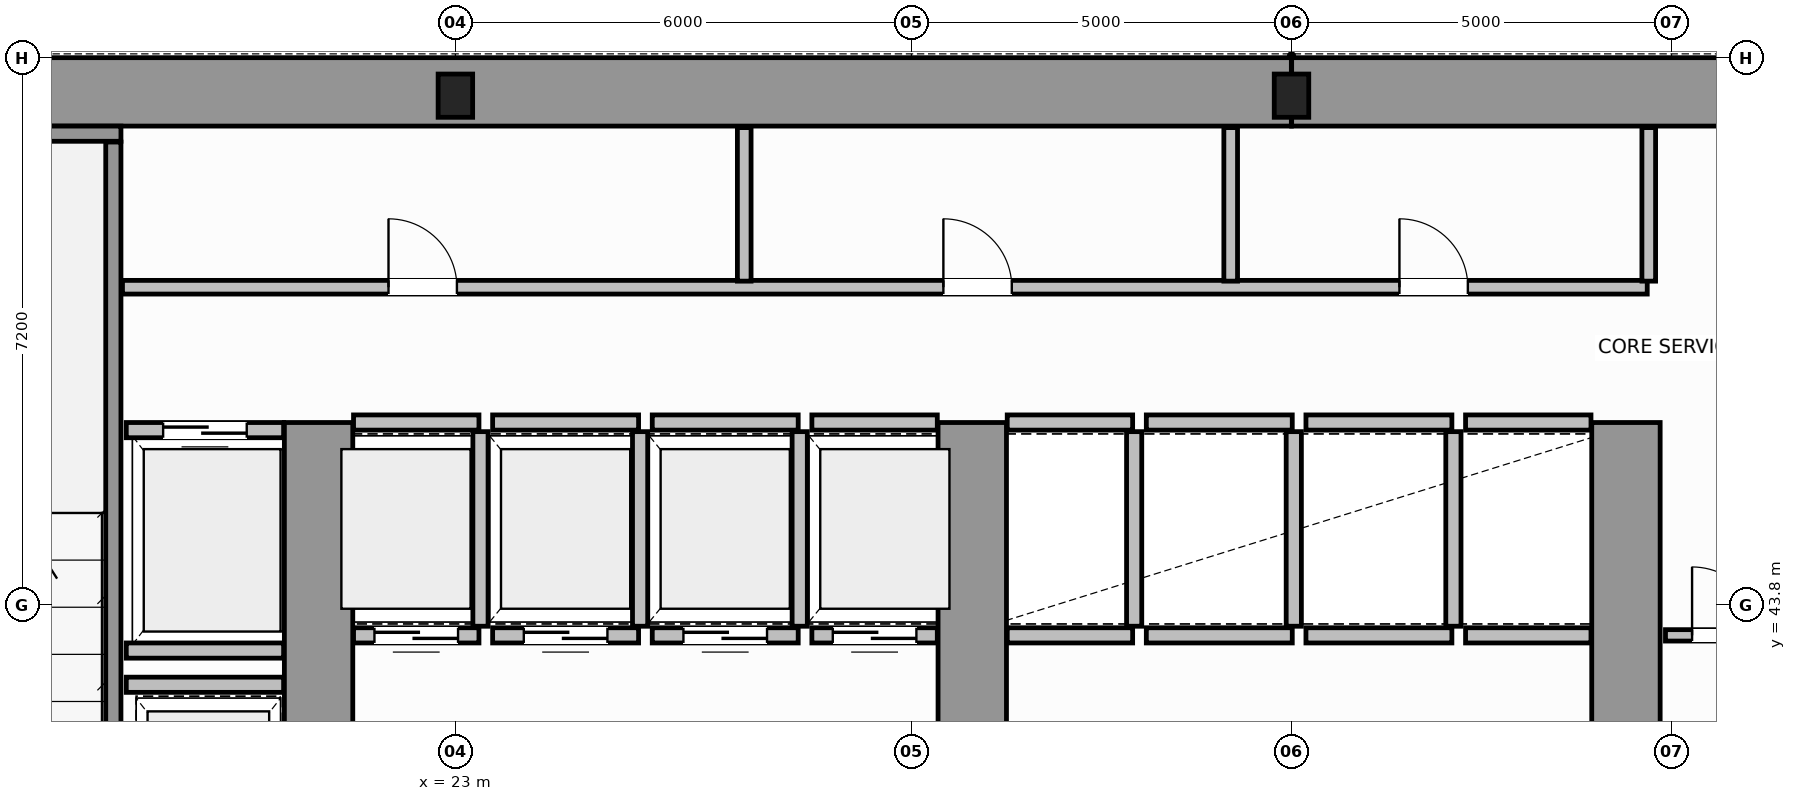
"""IFC4 building model, lengths in metres.
Left out: names, types, materials, properties, quantities, classifications, styles, units other than length and angle.
Written with IfcOpenShell. Run it as: python <this file> out.ifc"""

import sys

from ifc_helpers import new_model, si_unit, direction, frame, frame_2d, origin, origin_2d, place, context, subcontext, project, spatial, rectangle, i_section, extrude, source, transform, mapped, element, fill, save


model = new_model("IFC4")
c1 = context("Model", 3, precision=1e-05, world=origin(), true_north=direction((0.0, 1.0)))
c2 = subcontext(c1, "Body", "Model", "MODEL_VIEW")
j1 = project(units=[si_unit("LENGTHUNIT", "METRE"), si_unit("PLANEANGLEUNIT", "RADIAN")], contexts=[c1])
p1 = place(None, origin())
s1 = spatial("IfcSite", under=j1, at=p1, CompositionType="ELEMENT")
p2 = place(p1, origin())
s2 = spatial("IfcBuilding", under=s1, at=p2, CompositionType="ELEMENT")
p3 = place(p2, frame((0.0, 0.0, 56.8)))
s3 = spatial("IfcBuildingStorey", under=s2, at=p3, CompositionType="ELEMENT", Elevation=56.8)
m1 = source(origin(), c2, "Body", "SweptSolid", [
    extrude(i_section(OverallWidth=0.454, OverallDepth=0.569, WebThickness=0.078, FlangeThickness=0.08, FilletRadius=0.015, at=origin_2d()), origin(), (0.0, 0.0, 1.0), 3.8),
])
for number, where, z_axis, x_axis in (
    (1, (23.0, 50.5, 0.0), (0.0, 0.0, 1.0), (1.0, 0.0, 0.0)),
    (2, (34.0, 50.5, 0.0), (0.0, 0.0, 1.0), (1.0, 0.0, 0.0)),
):
    element("IfcColumn", number, at=place(p3, frame(where, z_axis=z_axis, x_axis=x_axis)), inside=s3, PredefinedType="COLUMN", context=c2, shape_type="MappedRepresentation", body=[
        mapped(m1, transform((0.0, 0.0, 0.0), scale=1.0)),
    ])
for number, where, z_axis, x_axis in (
    (3, (14.454, 50.55, 0.0), (0.0, 0.0, 1.0), (1.0, 0.0, 0.0)),
    (4, (34.002, 50.55, 0.0), (0.0, 0.0, 1.0), (1.0, 0.0, 0.0)),
):
    element("IfcWall", number, at=place(p3, frame(where, z_axis=z_axis, x_axis=x_axis)), inside=s3, PredefinedType="SHEAR", context=c2, shape_type="SweptSolid", body=[
        extrude(rectangle(XDim=19.544, YDim=0.9, at=frame_2d((9.772, 0.0))), origin(), (0.0, 0.0, 1.0), 3.8),
    ])
for number, where, z_axis, x_axis in (
    (5, (21.2, 36.97, 0.0), (0.0, 0.0, 1.0), (0.0, 1.0, 0.0)),
    (6, (29.8, 36.97, 0.0), (0.0, 0.0, 1.0), (0.0, 1.0, 0.0)),
    (7, (38.4, 36.97, 0.0), (0.0, 0.0, 1.0), (0.0, 1.0, 0.0)),
):
    element("IfcWall", number, at=place(p3, frame(where, z_axis=z_axis, x_axis=x_axis)), inside=s3, PredefinedType="SHEAR", context=c2, shape_type="SweptSolid", body=[
        extrude(rectangle(XDim=9.23, YDim=0.9, at=frame_2d((4.615, 0.0))), origin(), (0.0, 0.0, 1.0), 3.8),
    ])
p4 = place(p3, frame((14.45, 50.0, 0.0), z_axis=(0.0, 0.0, 1.0), x_axis=(1.0, 0.0, 0.0)))
e8 = element("IfcWall", 8, at=p4, inside=s3, PredefinedType="SOLIDWALL", context=c2, shape_type="SweptSolid", body=[
    extrude(rectangle(XDim=4.15, YDim=0.2, at=frame_2d((2.075, 0.0))), origin(), (0.0, 0.0, 1.0), 3.8),
])
p5 = place(p3, frame((18.5, 39.96, 0.0), z_axis=(0.0, 0.0, 1.0), x_axis=(0.0, 1.0, 0.0)))
e9 = element("IfcWall", 9, at=p5, inside=s3, PredefinedType="SOLIDWALL", context=c2, shape_type="SweptSolid", body=[
    extrude(rectangle(XDim=9.93, YDim=0.2, at=frame_2d((4.965, 0.0))), origin(), (0.0, 0.0, 1.0), 3.8),
])
p6 = place(p3, frame((21.66, 43.4, 0.0), z_axis=(0.0, 0.0, 1.0), x_axis=(1.0, 0.0, 0.0)))
e10 = element("IfcWall", 10, at=p6, inside=s3, PredefinedType="SOLIDWALL", context=c2, shape_type="SweptSolid", body=[
    extrude(rectangle(XDim=1.65, YDim=0.2, at=frame_2d((0.825, 0.0))), origin(), (0.0, 0.0, 1.0), 3.58),
])
p7 = place(p6, frame((0.275, 0.0, 0.0)))
e11 = element("IfcOpeningElement", 11, at=p7, cuts=e10, PredefinedType="OPENING", context=c2, shape_type="SweptSolid", body=[
    extrude(rectangle(XDim=1.1, YDim=2.15, at=frame_2d((0.55, 1.075))), frame((0.0, 0.11, 0.0), z_axis=(0.0, -1.0, 0.0), x_axis=(1.0, 0.0, 0.0)), (0.0, 0.0, 1.0), 0.22),
])
p8 = place(p3, frame((21.66, 46.2, 0.0), z_axis=(0.0, 0.0, 1.0), x_axis=(1.0, 0.0, 0.0)))
e12 = element("IfcWall", 12, at=p8, inside=s3, PredefinedType="SOLIDWALL", context=c2, shape_type="SweptSolid", body=[
    extrude(rectangle(XDim=1.65, YDim=0.2, at=frame_2d((0.825, 0.0))), origin(), (0.0, 0.0, 1.0), 3.58),
])
p9 = place(p3, frame((23.33, 43.52, 0.0), z_axis=(0.0, 0.0, 1.0), x_axis=(0.0, 1.0, 0.0)))
e13 = element("IfcWall", 13, at=p9, inside=s3, PredefinedType="SOLIDWALL", context=c2, shape_type="SweptSolid", body=[
    extrude(rectangle(XDim=2.56, YDim=0.2, at=frame_2d((1.28, 0.0))), origin(), (0.0, 0.0, 1.0), 3.58),
])
p10 = place(p3, frame((23.49, 43.4, 0.0), z_axis=(0.0, 0.0, 1.0), x_axis=(1.0, 0.0, 0.0)))
e14 = element("IfcWall", 14, at=p10, inside=s3, PredefinedType="SOLIDWALL", context=c2, shape_type="SweptSolid", body=[
    extrude(rectangle(XDim=1.92, YDim=0.2, at=frame_2d((0.96, 0.0))), origin(), (0.0, 0.0, 1.0), 3.58),
])
p11 = place(p10, frame((0.41, 0.0, 0.0)))
e15 = element("IfcOpeningElement", 15, at=p11, cuts=e14, PredefinedType="OPENING", context=c2, shape_type="SweptSolid", body=[
    extrude(rectangle(XDim=1.1, YDim=2.15, at=frame_2d((0.55, 1.075))), frame((0.0, 0.11, 0.0), z_axis=(0.0, -1.0, 0.0), x_axis=(1.0, 0.0, 0.0)), (0.0, 0.0, 1.0), 0.22),
])
p12 = place(p3, frame((23.49, 46.2, 0.0), z_axis=(0.0, 0.0, 1.0), x_axis=(1.0, 0.0, 0.0)))
e16 = element("IfcWall", 16, at=p12, inside=s3, PredefinedType="SOLIDWALL", context=c2, shape_type="SweptSolid", body=[
    extrude(rectangle(XDim=1.92, YDim=0.2, at=frame_2d((0.96, 0.0))), origin(), (0.0, 0.0, 1.0), 3.58),
])
p13 = place(p3, frame((25.43, 43.52, 0.0), z_axis=(0.0, 0.0, 1.0), x_axis=(0.0, 1.0, 0.0)))
e17 = element("IfcWall", 17, at=p13, inside=s3, PredefinedType="SOLIDWALL", context=c2, shape_type="SweptSolid", body=[
    extrude(rectangle(XDim=2.56, YDim=0.2, at=frame_2d((1.28, 0.0))), origin(), (0.0, 0.0, 1.0), 3.58),
])
p14 = place(p3, frame((25.59, 43.4, 0.0), z_axis=(0.0, 0.0, 1.0), x_axis=(1.0, 0.0, 0.0)))
e18 = element("IfcWall", 18, at=p14, inside=s3, PredefinedType="SOLIDWALL", context=c2, shape_type="SweptSolid", body=[
    extrude(rectangle(XDim=1.92, YDim=0.2, at=frame_2d((0.96, 0.0))), origin(), (0.0, 0.0, 1.0), 3.58),
])
p15 = place(p14, frame((0.41, 0.0, 0.0)))
e19 = element("IfcOpeningElement", 19, at=p15, cuts=e18, PredefinedType="OPENING", context=c2, shape_type="SweptSolid", body=[
    extrude(rectangle(XDim=1.1, YDim=2.15, at=frame_2d((0.55, 1.075))), frame((0.0, 0.11, 0.0), z_axis=(0.0, -1.0, 0.0), x_axis=(1.0, 0.0, 0.0)), (0.0, 0.0, 1.0), 0.22),
])
p16 = place(p3, frame((25.59, 46.2, 0.0), z_axis=(0.0, 0.0, 1.0), x_axis=(1.0, 0.0, 0.0)))
e20 = element("IfcWall", 20, at=p16, inside=s3, PredefinedType="SOLIDWALL", context=c2, shape_type="SweptSolid", body=[
    extrude(rectangle(XDim=1.92, YDim=0.2, at=frame_2d((0.96, 0.0))), origin(), (0.0, 0.0, 1.0), 3.58),
])
p17 = place(p3, frame((27.53, 43.52, 0.0), z_axis=(0.0, 0.0, 1.0), x_axis=(0.0, 1.0, 0.0)))
e21 = element("IfcWall", 21, at=p17, inside=s3, PredefinedType="SOLIDWALL", context=c2, shape_type="SweptSolid", body=[
    extrude(rectangle(XDim=2.56, YDim=0.2, at=frame_2d((1.28, 0.0))), origin(), (0.0, 0.0, 1.0), 3.58),
])
p18 = place(p3, frame((27.69, 43.4, 0.0), z_axis=(0.0, 0.0, 1.0), x_axis=(1.0, 0.0, 0.0)))
e22 = element("IfcWall", 22, at=p18, inside=s3, PredefinedType="SOLIDWALL", context=c2, shape_type="SweptSolid", body=[
    extrude(rectangle(XDim=1.65, YDim=0.2, at=frame_2d((0.825, 0.0))), origin(), (0.0, 0.0, 1.0), 3.58),
])
p19 = place(p18, frame((0.275, 0.0, 0.0)))
e23 = element("IfcOpeningElement", 23, at=p19, cuts=e22, PredefinedType="OPENING", context=c2, shape_type="SweptSolid", body=[
    extrude(rectangle(XDim=1.1, YDim=2.15, at=frame_2d((0.55, 1.075))), frame((0.0, 0.11, 0.0), z_axis=(0.0, -1.0, 0.0), x_axis=(1.0, 0.0, 0.0)), (0.0, 0.0, 1.0), 0.22),
])
p20 = place(p3, frame((27.69, 46.2, 0.0), z_axis=(0.0, 0.0, 1.0), x_axis=(1.0, 0.0, 0.0)))
e24 = element("IfcWall", 24, at=p20, inside=s3, PredefinedType="SOLIDWALL", context=c2, shape_type="SweptSolid", body=[
    extrude(rectangle(XDim=1.65, YDim=0.2, at=frame_2d((0.825, 0.0))), origin(), (0.0, 0.0, 1.0), 3.58),
])
for number, where, z_axis, x_axis in (
    (25, (30.26, 43.4, 0.0), (0.0, 0.0, 1.0), (1.0, 0.0, 0.0)),
    (26, (30.26, 46.2, 0.0), (0.0, 0.0, 1.0), (1.0, 0.0, 0.0)),
):
    element("IfcWall", number, at=place(p3, frame(where, z_axis=z_axis, x_axis=x_axis)), inside=s3, PredefinedType="SOLIDWALL", context=c2, shape_type="SweptSolid", body=[
        extrude(rectangle(XDim=1.65, YDim=0.2, at=frame_2d((0.825, 0.0))), origin(), (0.0, 0.0, 1.0), 3.58),
    ])
p21 = place(p3, frame((31.93, 43.52, 0.0), z_axis=(0.0, 0.0, 1.0), x_axis=(0.0, 1.0, 0.0)))
e27 = element("IfcWall", 27, at=p21, inside=s3, PredefinedType="SOLIDWALL", context=c2, shape_type="SweptSolid", body=[
    extrude(rectangle(XDim=2.56, YDim=0.2, at=frame_2d((1.28, 0.0))), origin(), (0.0, 0.0, 1.0), 3.58),
])
for number, where, z_axis, x_axis in (
    (28, (32.09, 43.4, 0.0), (0.0, 0.0, 1.0), (1.0, 0.0, 0.0)),
    (29, (32.09, 46.2, 0.0), (0.0, 0.0, 1.0), (1.0, 0.0, 0.0)),
):
    element("IfcWall", number, at=place(p3, frame(where, z_axis=z_axis, x_axis=x_axis)), inside=s3, PredefinedType="SOLIDWALL", context=c2, shape_type="SweptSolid", body=[
        extrude(rectangle(XDim=1.92, YDim=0.2, at=frame_2d((0.96, 0.0))), origin(), (0.0, 0.0, 1.0), 3.58),
    ])
p22 = place(p3, frame((34.03, 43.52, 0.0), z_axis=(0.0, 0.0, 1.0), x_axis=(0.0, 1.0, 0.0)))
e30 = element("IfcWall", 30, at=p22, inside=s3, PredefinedType="SOLIDWALL", context=c2, shape_type="SweptSolid", body=[
    extrude(rectangle(XDim=2.56, YDim=0.2, at=frame_2d((1.28, 0.0))), origin(), (0.0, 0.0, 1.0), 3.58),
])
for number, where, z_axis, x_axis in (
    (31, (34.19, 43.4, 0.0), (0.0, 0.0, 1.0), (1.0, 0.0, 0.0)),
    (32, (34.19, 46.2, 0.0), (0.0, 0.0, 1.0), (1.0, 0.0, 0.0)),
):
    element("IfcWall", number, at=place(p3, frame(where, z_axis=z_axis, x_axis=x_axis)), inside=s3, PredefinedType="SOLIDWALL", context=c2, shape_type="SweptSolid", body=[
        extrude(rectangle(XDim=1.92, YDim=0.2, at=frame_2d((0.96, 0.0))), origin(), (0.0, 0.0, 1.0), 3.58),
    ])
p23 = place(p3, frame((36.13, 43.52, 0.0), z_axis=(0.0, 0.0, 1.0), x_axis=(0.0, 1.0, 0.0)))
e33 = element("IfcWall", 33, at=p23, inside=s3, PredefinedType="SOLIDWALL", context=c2, shape_type="SweptSolid", body=[
    extrude(rectangle(XDim=2.56, YDim=0.2, at=frame_2d((1.28, 0.0))), origin(), (0.0, 0.0, 1.0), 3.58),
])
for number, where, z_axis, x_axis in (
    (34, (36.29, 43.4, 0.0), (0.0, 0.0, 1.0), (1.0, 0.0, 0.0)),
    (35, (36.29, 46.2, 0.0), (0.0, 0.0, 1.0), (1.0, 0.0, 0.0)),
):
    element("IfcWall", number, at=place(p3, frame(where, z_axis=z_axis, x_axis=x_axis)), inside=s3, PredefinedType="SOLIDWALL", context=c2, shape_type="SweptSolid", body=[
        extrude(rectangle(XDim=1.65, YDim=0.2, at=frame_2d((0.825, 0.0))), origin(), (0.0, 0.0, 1.0), 3.58),
    ])
p24 = place(p3, frame((18.67, 46.1, 0.0), z_axis=(0.0, 0.0, 1.0), x_axis=(1.0, 0.0, 0.0)))
e36 = element("IfcWall", 36, at=p24, inside=s3, PredefinedType="SOLIDWALL", context=c2, shape_type="SweptSolid", body=[
    extrude(rectangle(XDim=2.07, YDim=0.2, at=frame_2d((1.035, 0.0))), origin(), (0.0, 0.0, 1.0), 3.58),
])
p25 = place(p24, frame((0.485, 0.0, 0.0)))
e37 = element("IfcOpeningElement", 37, at=p25, cuts=e36, PredefinedType="OPENING", context=c2, shape_type="SweptSolid", body=[
    extrude(rectangle(XDim=1.1, YDim=2.15, at=frame_2d((0.55, 1.075))), frame((0.0, 0.11, 0.0), z_axis=(0.0, -1.0, 0.0), x_axis=(1.0, 0.0, 0.0)), (0.0, 0.0, 1.0), 0.22),
])
for number, where, z_axis, x_axis in (
    (38, (18.67, 43.2, 0.0), (0.0, 0.0, 1.0), (1.0, 0.0, 0.0)),
    (39, (18.67, 42.75, 0.0), (0.0, 0.0, 1.0), (1.0, 0.0, 0.0)),
):
    element("IfcWall", number, at=place(p3, frame(where, z_axis=z_axis, x_axis=x_axis)), inside=s3, PredefinedType="SOLIDWALL", context=c2, shape_type="SweptSolid", body=[
        extrude(rectangle(XDim=2.07, YDim=0.2, at=frame_2d((1.035, 0.0))), origin(), (0.0, 0.0, 1.0), 3.58),
    ])
p26 = place(p3, frame((38.92, 43.4, 0.0), z_axis=(0.0, 0.0, 1.0), x_axis=(1.0, 0.0, 0.0)))
e40 = element("IfcWall", 40, at=p26, inside=s3, PredefinedType="PARTITIONING", context=c2, shape_type="SweptSolid", body=[
    extrude(rectangle(XDim=1.6, YDim=0.15, at=frame_2d((0.8, 0.0))), origin(), (0.0, 0.0, 1.0), 3.58),
])
p27 = place(p26, frame((0.35, 0.0, 0.0)))
e41 = element("IfcOpeningElement", 41, at=p27, cuts=e40, PredefinedType="OPENING", context=c2, shape_type="SweptSolid", body=[
    extrude(rectangle(XDim=0.9, YDim=2.1, at=frame_2d((0.45, 1.05))), frame((0.0, 0.085, 0.0), z_axis=(0.0, -1.0, 0.0), x_axis=(1.0, 0.0, 0.0)), (0.0, 0.0, 1.0), 0.17),
])
p28 = place(p3, frame((18.62, 47.98, 0.0), z_axis=(0.0, 0.0, 1.0), x_axis=(1.0, 0.0, 0.0)))
e42 = element("IfcWall", 42, at=p28, inside=s3, PredefinedType="PLUMBINGWALL", context=c2, shape_type="SweptSolid", body=[
    extrude(rectangle(XDim=20.06, YDim=0.18, at=frame_2d((10.03, 0.0))), origin(), (0.0, 0.0, 1.0), 3.58),
])
p29 = place(p28, frame((3.5, 0.0, 0.0)))
e43 = element("IfcOpeningElement", 43, at=p29, cuts=e42, PredefinedType="OPENING", context=c2, shape_type="SweptSolid", body=[
    extrude(rectangle(XDim=0.9, YDim=2.15, at=frame_2d((0.45, 1.075))), frame((0.0, 0.1, 0.0), z_axis=(0.0, -1.0, 0.0), x_axis=(1.0, 0.0, 0.0)), (0.0, 0.0, 1.0), 0.2),
])
p30 = place(p28, frame((10.8, 0.0, 0.0)))
e44 = element("IfcOpeningElement", 44, at=p30, cuts=e42, PredefinedType="OPENING", context=c2, shape_type="SweptSolid", body=[
    extrude(rectangle(XDim=0.9, YDim=2.15, at=frame_2d((0.45, 1.075))), frame((0.0, 0.1, 0.0), z_axis=(0.0, -1.0, 0.0), x_axis=(1.0, 0.0, 0.0)), (0.0, 0.0, 1.0), 0.2),
])
p31 = place(p28, frame((16.8, 0.0, 0.0)))
e45 = element("IfcOpeningElement", 45, at=p31, cuts=e42, PredefinedType="OPENING", context=c2, shape_type="SweptSolid", body=[
    extrude(rectangle(XDim=0.9, YDim=2.15, at=frame_2d((0.45, 1.075))), frame((0.0, 0.1, 0.0), z_axis=(0.0, -1.0, 0.0), x_axis=(1.0, 0.0, 0.0)), (0.0, 0.0, 1.0), 0.2),
])
for number, where, z_axis, x_axis in (
    (46, (26.8, 48.06, 0.0), (0.0, 0.0, 1.0), (0.0, 1.0, 0.0)),
    (47, (33.2, 48.06, 0.0), (0.0, 0.0, 1.0), (0.0, 1.0, 0.0)),
    (48, (38.7, 48.06, 0.0), (0.0, 0.0, 1.0), (0.0, 1.0, 0.0)),
):
    element("IfcWall", number, at=place(p3, frame(where, z_axis=z_axis, x_axis=x_axis)), inside=s3, PredefinedType="PLUMBINGWALL", context=c2, shape_type="SweptSolid", body=[
        extrude(rectangle(XDim=2.02, YDim=0.18, at=frame_2d((1.01, 0.0))), origin(), (0.0, 0.0, 1.0), 3.58),
    ])
m2 = source(origin(), c2, "Body", "SweptSolid", [
    extrude(rectangle(XDim=1.1, YDim=2.15, at=frame_2d((0.55, 1.075))), frame((0.0, 0.025, 0.0), z_axis=(0.0, -1.0, 0.0), x_axis=(1.0, 0.0, 0.0)), (0.0, 0.0, 1.0), 0.05),
])
p32 = place(p7, origin())
e49 = element("IfcDoor", 49, at=p32, inside=s3, OperationType="DOUBLE_DOOR_SLIDING", PredefinedType="DOOR", context=c2, shape_type="MappedRepresentation", body=[
    mapped(m2, transform((0.0, 0.0, 0.0), scale=1.0)),
])
fill(e11, e49)
p33 = place(p11, origin())
e50 = element("IfcDoor", 50, at=p33, inside=s3, OperationType="DOUBLE_DOOR_SLIDING", PredefinedType="DOOR", context=c2, shape_type="MappedRepresentation", body=[
    mapped(m2, transform((0.0, 0.0, 0.0), scale=1.0)),
])
fill(e15, e50)
p34 = place(p15, origin())
e51 = element("IfcDoor", 51, at=p34, inside=s3, OperationType="DOUBLE_DOOR_SLIDING", PredefinedType="DOOR", context=c2, shape_type="MappedRepresentation", body=[
    mapped(m2, transform((0.0, 0.0, 0.0), scale=1.0)),
])
fill(e19, e51)
p35 = place(p19, origin())
e52 = element("IfcDoor", 52, at=p35, inside=s3, OperationType="DOUBLE_DOOR_SLIDING", PredefinedType="DOOR", context=c2, shape_type="MappedRepresentation", body=[
    mapped(m2, transform((0.0, 0.0, 0.0), scale=1.0)),
])
fill(e23, e52)
p36 = place(p25, origin())
e53 = element("IfcDoor", 53, at=p36, inside=s3, OperationType="DOUBLE_DOOR_SLIDING", PredefinedType="DOOR", context=c2, shape_type="MappedRepresentation", body=[
    mapped(m2, transform((0.0, 0.0, 0.0), scale=1.0)),
])
fill(e37, e53)
m3 = source(origin(), c2, "Body", "SweptSolid", [
    extrude(rectangle(XDim=0.9, YDim=2.1, at=frame_2d((0.45, 1.05))), frame((0.0, 0.025, 0.0), z_axis=(0.0, -1.0, 0.0), x_axis=(1.0, 0.0, 0.0)), (0.0, 0.0, 1.0), 0.05),
])
p37 = place(p27, origin())
e54 = element("IfcDoor", 54, at=p37, inside=s3, OperationType="SINGLE_SWING_LEFT", PredefinedType="DOOR", context=c2, shape_type="MappedRepresentation", body=[
    mapped(m3, transform((0.0, 0.0, 0.0), scale=1.0)),
])
fill(e41, e54)
m4 = source(origin(), c2, "Body", "SweptSolid", [
    extrude(rectangle(XDim=0.9, YDim=2.15, at=frame_2d((0.45, 1.075))), frame((0.0, 0.025, 0.0), z_axis=(0.0, -1.0, 0.0), x_axis=(1.0, 0.0, 0.0)), (0.0, 0.0, 1.0), 0.05),
])
p38 = place(p29, origin())
e55 = element("IfcDoor", 55, at=p38, inside=s3, OperationType="SINGLE_SWING_LEFT", PredefinedType="DOOR", context=c2, shape_type="MappedRepresentation", body=[
    mapped(m4, transform((0.0, 0.0, 0.0), scale=1.0)),
])
fill(e43, e55)
p39 = place(p30, origin())
e56 = element("IfcDoor", 56, at=p39, inside=s3, OperationType="SINGLE_SWING_RIGHT", PredefinedType="DOOR", context=c2, shape_type="MappedRepresentation", body=[
    mapped(m4, transform((0.0, 0.0, 0.0), scale=1.0)),
])
fill(e44, e56)
p40 = place(p31, origin())
e57 = element("IfcDoor", 57, at=p40, inside=s3, OperationType="SINGLE_SWING_LEFT", PredefinedType="DOOR", context=c2, shape_type="MappedRepresentation", body=[
    mapped(m4, transform((0.0, 0.0, 0.0), scale=1.0)),
])
fill(e45, e57)
save(model, sys.argv[1])
